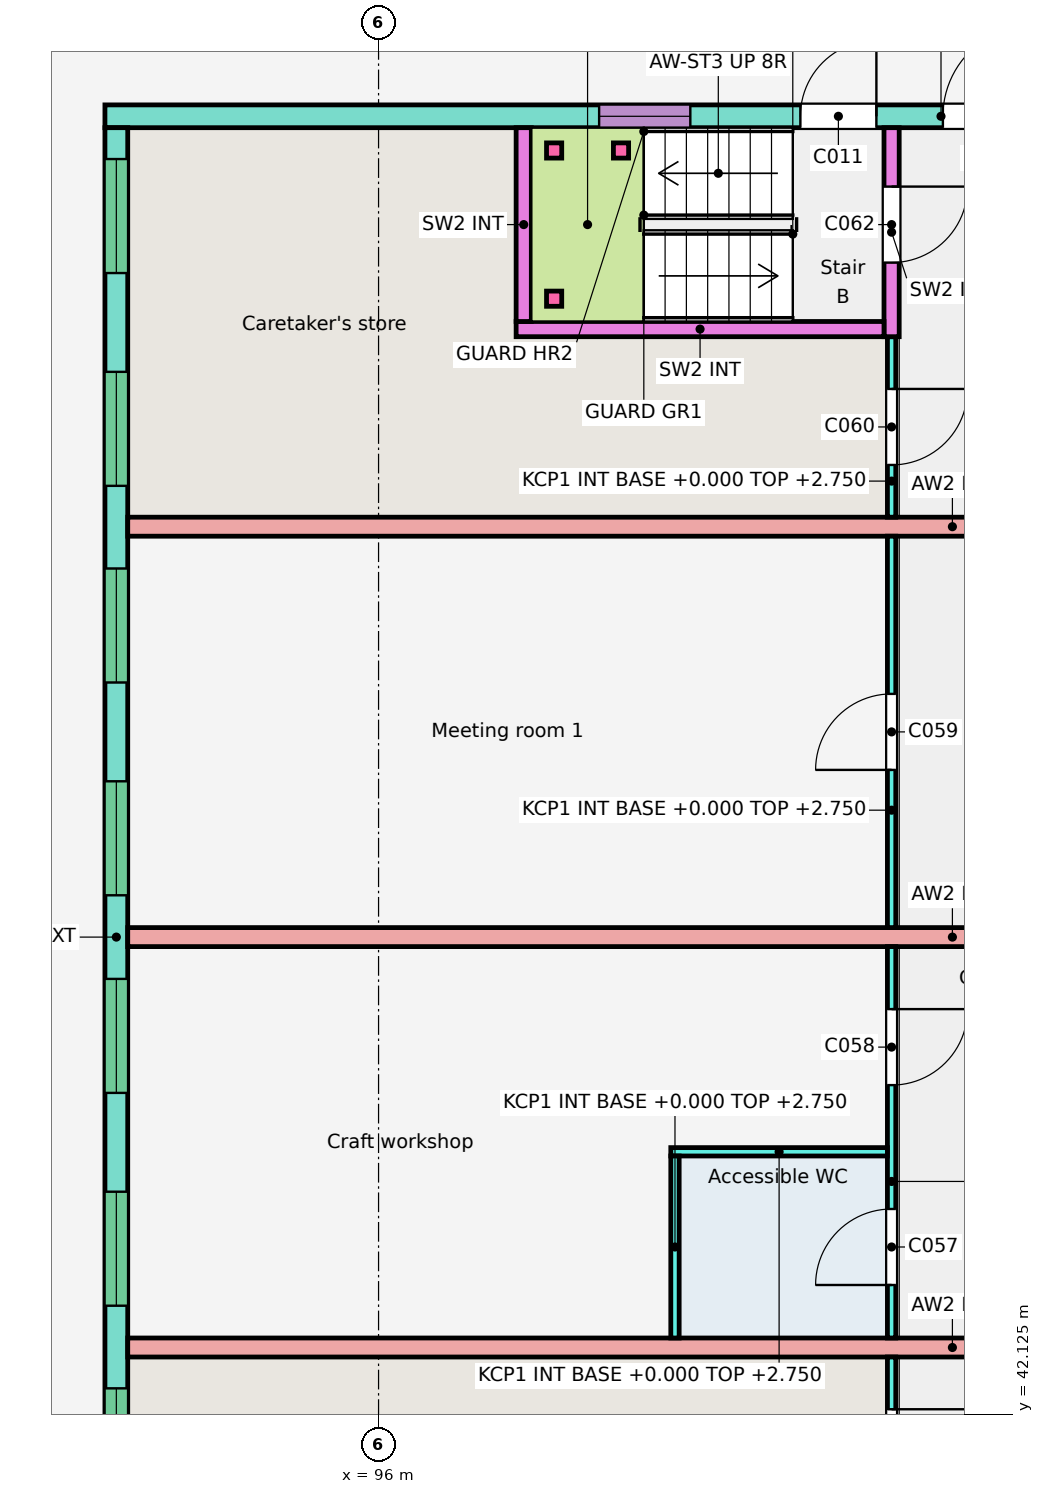
"""IFC4 building model, lengths in metres.
Left out: names, types, materials, properties, quantities, classifications, styles, units other than length and angle.
Written with IfcOpenShell. Run it as: python <this file> out.ifc"""

import sys

from ifc_helpers import new_model, si_unit, direction, frame, frame_2d, origin, origin_2d, place, context, subcontext, project, spatial, rectangle, extrude, element, fill, save


model = new_model("IFC4")
c1 = context("Model", 3, precision=1e-05, world=origin(), true_north=direction((0.0, 1.0)))
c2 = subcontext(c1, "Body", "Model", "MODEL_VIEW")
j1 = project(units=[si_unit("LENGTHUNIT", "METRE"), si_unit("PLANEANGLEUNIT", "RADIAN")], contexts=[c1])
p1 = place(None, origin())
s1 = spatial("IfcSite", under=j1, at=p1, CompositionType="ELEMENT")
p2 = place(p1, origin())
s2 = spatial("IfcBuilding", under=s1, at=p2, CompositionType="ELEMENT")
p3 = place(p2, origin())
s3 = spatial("IfcBuildingStorey", under=s2, at=p3, CompositionType="ELEMENT", Elevation=0.0)
p4 = place(p3, frame((114.4, 59.2, -0.25), z_axis=(0.0, 0.0, 1.0), x_axis=(-1.0, 0.0, 0.0)))
e1 = element("IfcWall", 1, at=p4, inside=s3, PredefinedType="SOLIDWALL", context=c2, shape_type="SweptSolid", body=[
    extrude(rectangle(XDim=22.0, YDim=0.3, at=frame_2d((11.0, 0.0))), origin(), (0.0, 0.0, 1.0), 3.25),
])
p5 = place(p4, frame((14.298, 0.0, 1.15)))
e2 = element("IfcOpeningElement", 2, at=p5, cuts=e1, PredefinedType="OPENING", context=c2, shape_type="SweptSolid", body=[
    extrude(rectangle(XDim=1.2, YDim=1.5, at=frame_2d((0.6, 0.75))), frame((0.0, 0.16, 0.0), z_axis=(0.0, -1.0, 0.0), x_axis=(1.0, 0.0, 0.0)), (0.0, 0.0, 1.0), 0.32),
])
p6 = place(p4, frame((9.775, 0.0, 0.25)))
e3 = element("IfcOpeningElement", 3, at=p6, cuts=e1, PredefinedType="OPENING", context=c2, shape_type="SweptSolid", body=[
    extrude(rectangle(XDim=1.2, YDim=2.1, at=frame_2d((0.6, 1.05))), frame((0.0, 0.16, 0.0), z_axis=(0.0, -1.0, 0.0), x_axis=(1.0, 0.0, 0.0)), (0.0, 0.0, 1.0), 0.32),
])
p7 = place(p4, frame((11.85, 0.0, 0.25)))
e4 = element("IfcOpeningElement", 4, at=p7, cuts=e1, PredefinedType="OPENING", context=c2, shape_type="SweptSolid", body=[
    extrude(rectangle(XDim=1.0, YDim=2.1, at=frame_2d((0.5, 1.05))), frame((0.0, 0.16, 0.0), z_axis=(0.0, -1.0, 0.0), x_axis=(1.0, 0.0, 0.0)), (0.0, 0.0, 1.0), 0.32),
])
p8 = place(p3, frame((92.55, 37.75, -0.25), z_axis=(0.0, 0.0, 1.0), x_axis=(0.0, 1.0, 0.0)))
e5 = element("IfcWall", 5, at=p8, inside=s3, PredefinedType="SOLIDWALL", context=c2, shape_type="SweptSolid", body=[
    extrude(rectangle(XDim=21.3, YDim=0.3, at=frame_2d((10.65, 0.0))), origin(), (0.0, 0.0, 1.0), 3.25),
])
p9 = place(p8, frame((0.413, 0.0, 1.15)))
e6 = element("IfcOpeningElement", 6, at=p9, cuts=e5, PredefinedType="OPENING", context=c2, shape_type="SweptSolid", body=[
    extrude(rectangle(XDim=1.5, YDim=1.4, at=frame_2d((0.75, 0.7))), frame((0.0, 0.16, 0.0), z_axis=(0.0, -1.0, 0.0), x_axis=(1.0, 0.0, 0.0)), (0.0, 0.0, 1.0), 0.32),
])
p10 = place(p8, frame((3.212, 0.0, 1.15)))
e7 = element("IfcOpeningElement", 7, at=p10, cuts=e5, PredefinedType="OPENING", context=c2, shape_type="SweptSolid", body=[
    extrude(rectangle(XDim=1.5, YDim=1.4, at=frame_2d((0.75, 0.7))), frame((0.0, 0.16, 0.0), z_axis=(0.0, -1.0, 0.0), x_axis=(1.0, 0.0, 0.0)), (0.0, 0.0, 1.0), 0.32),
])
p11 = place(p8, frame((5.8, 0.0, 1.15)))
e8 = element("IfcOpeningElement", 8, at=p11, cuts=e5, PredefinedType="OPENING", context=c2, shape_type="SweptSolid", body=[
    extrude(rectangle(XDim=1.5, YDim=1.4, at=frame_2d((0.75, 0.7))), frame((0.0, 0.16, 0.0), z_axis=(0.0, -1.0, 0.0), x_axis=(1.0, 0.0, 0.0)), (0.0, 0.0, 1.0), 0.32),
])
p12 = place(p8, frame((8.6, 0.0, 1.15)))
e9 = element("IfcOpeningElement", 9, at=p12, cuts=e5, PredefinedType="OPENING", context=c2, shape_type="SweptSolid", body=[
    extrude(rectangle(XDim=1.5, YDim=1.4, at=frame_2d((0.75, 0.7))), frame((0.0, 0.16, 0.0), z_axis=(0.0, -1.0, 0.0), x_axis=(1.0, 0.0, 0.0)), (0.0, 0.0, 1.0), 0.32),
])
p13 = place(p8, frame((11.2, 0.0, 1.15)))
e10 = element("IfcOpeningElement", 10, at=p13, cuts=e5, PredefinedType="OPENING", context=c2, shape_type="SweptSolid", body=[
    extrude(rectangle(XDim=1.5, YDim=1.4, at=frame_2d((0.75, 0.7))), frame((0.0, 0.16, 0.0), z_axis=(0.0, -1.0, 0.0), x_axis=(1.0, 0.0, 0.0)), (0.0, 0.0, 1.0), 0.32),
])
p14 = place(p8, frame((14.0, 0.0, 1.15)))
e11 = element("IfcOpeningElement", 11, at=p14, cuts=e5, PredefinedType="OPENING", context=c2, shape_type="SweptSolid", body=[
    extrude(rectangle(XDim=1.5, YDim=1.4, at=frame_2d((0.75, 0.7))), frame((0.0, 0.16, 0.0), z_axis=(0.0, -1.0, 0.0), x_axis=(1.0, 0.0, 0.0)), (0.0, 0.0, 1.0), 0.32),
])
p15 = place(p8, frame((16.587, 0.0, 1.15)))
e12 = element("IfcOpeningElement", 12, at=p15, cuts=e5, PredefinedType="OPENING", context=c2, shape_type="SweptSolid", body=[
    extrude(rectangle(XDim=1.5, YDim=1.4, at=frame_2d((0.75, 0.7))), frame((0.0, 0.16, 0.0), z_axis=(0.0, -1.0, 0.0), x_axis=(1.0, 0.0, 0.0)), (0.0, 0.0, 1.0), 0.32),
])
p16 = place(p8, frame((19.387, 0.0, 1.15)))
e13 = element("IfcOpeningElement", 13, at=p16, cuts=e5, PredefinedType="OPENING", context=c2, shape_type="SweptSolid", body=[
    extrude(rectangle(XDim=1.5, YDim=1.4, at=frame_2d((0.75, 0.7))), frame((0.0, 0.16, 0.0), z_axis=(0.0, -1.0, 0.0), x_axis=(1.0, 0.0, 0.0)), (0.0, 0.0, 1.0), 0.32),
])
for number, where, z_axis, x_axis in (
    (14, (114.4, 43.0, -0.25), (0.0, 0.0, 1.0), (-1.0, 0.0, 0.0)),
    (15, (114.4, 48.4, -0.25), (0.0, 0.0, 1.0), (-1.0, 0.0, 0.0)),
    (16, (114.4, 53.8, -0.25), (0.0, 0.0, 1.0), (-1.0, 0.0, 0.0)),
):
    element("IfcWall", number, at=place(p3, frame(where, z_axis=z_axis, x_axis=x_axis)), inside=s3, PredefinedType="SOLIDWALL", context=c2, shape_type="SweptSolid", body=[
        extrude(rectangle(XDim=21.7, YDim=0.25, at=frame_2d((10.85, 0.0))), origin(), (0.0, 0.0, 1.0), 3.25),
    ])
for number, where, z_axis, x_axis in (
    (17, (98.31, 56.8, 0.0), (0.0, 0.0, 1.0), (1.0, 0.0, 0.0)),
    (18, (98.31, 58.75, 0.0), (0.0, 0.0, 1.0), (1.0, 0.0, 0.0)),
    (19, (99.19, 58.75, 0.0), (0.0, 0.0, 1.0), (1.0, 0.0, 0.0)),
):
    element("IfcColumn", number, at=place(p3, frame(where, z_axis=z_axis, x_axis=x_axis)), inside=s3, PredefinedType="COLUMN", context=c2, shape_type="SweptSolid", body=[
        extrude(rectangle(XDim=0.2, YDim=0.2, at=origin_2d()), origin(), (0.0, 0.0, 1.0), 1.3),
    ])
p17 = place(p3, frame((102.75, 40.5, 0.0), z_axis=(0.0, 0.0, 1.0), x_axis=(0.0, 1.0, 0.0)))
e20 = element("IfcWall", 20, at=p17, inside=s3, PredefinedType="PARTITIONING", context=c2, shape_type="SweptSolid", body=[
    extrude(rectangle(XDim=2.375, YDim=0.11, at=frame_2d((1.188, 0.0))), origin(), (0.0, 0.0, 1.0), 2.75),
])
p18 = place(p17, frame((0.688, 0.0, 0.0)))
e21 = element("IfcOpeningElement", 21, at=p18, cuts=e20, PredefinedType="OPENING", context=c2, shape_type="SweptSolid", body=[
    extrude(rectangle(XDim=1.0, YDim=2.1, at=frame_2d((0.5, 1.05))), frame((0.0, 0.065, 0.0), z_axis=(0.0, -1.0, 0.0), x_axis=(1.0, 0.0, 0.0)), (0.0, 0.0, 1.0), 0.13),
])
p19 = place(p3, frame((102.75, 43.125, 0.0), z_axis=(0.0, 0.0, 1.0), x_axis=(0.0, 1.0, 0.0)))
e22 = element("IfcWall", 22, at=p19, inside=s3, PredefinedType="PARTITIONING", context=c2, shape_type="SweptSolid", body=[
    extrude(rectangle(XDim=5.15, YDim=0.11, at=frame_2d((2.575, 0.0))), origin(), (0.0, 0.0, 1.0), 2.75),
])
p20 = place(p19, frame((0.698, 0.0, 0.0)))
e23 = element("IfcOpeningElement", 23, at=p20, cuts=e22, PredefinedType="OPENING", context=c2, shape_type="SweptSolid", body=[
    extrude(rectangle(XDim=1.0, YDim=2.1, at=frame_2d((0.5, 1.05))), frame((0.0, 0.065, 0.0), z_axis=(0.0, -1.0, 0.0), x_axis=(1.0, 0.0, 0.0)), (0.0, 0.0, 1.0), 0.13),
])
p21 = place(p19, frame((3.327, 0.0, 0.0)))
e24 = element("IfcOpeningElement", 24, at=p21, cuts=e22, PredefinedType="OPENING", context=c2, shape_type="SweptSolid", body=[
    extrude(rectangle(XDim=1.0, YDim=2.1, at=frame_2d((0.5, 1.05))), frame((0.0, 0.065, 0.0), z_axis=(0.0, -1.0, 0.0), x_axis=(1.0, 0.0, 0.0)), (0.0, 0.0, 1.0), 0.13),
])
p22 = place(p3, frame((102.75, 48.525, 0.0), z_axis=(0.0, 0.0, 1.0), x_axis=(0.0, 1.0, 0.0)))
e25 = element("IfcWall", 25, at=p22, inside=s3, PredefinedType="PARTITIONING", context=c2, shape_type="SweptSolid", body=[
    extrude(rectangle(XDim=5.15, YDim=0.11, at=frame_2d((2.575, 0.0))), origin(), (0.0, 0.0, 1.0), 2.75),
])
p23 = place(p22, frame((2.075, 0.0, 0.0)))
e26 = element("IfcOpeningElement", 26, at=p23, cuts=e25, PredefinedType="OPENING", context=c2, shape_type="SweptSolid", body=[
    extrude(rectangle(XDim=1.0, YDim=2.1, at=frame_2d((0.5, 1.05))), frame((0.0, 0.065, 0.0), z_axis=(0.0, -1.0, 0.0), x_axis=(1.0, 0.0, 0.0)), (0.0, 0.0, 1.0), 0.13),
])
p24 = place(p3, frame((102.75, 53.925, 0.0), z_axis=(0.0, 0.0, 1.0), x_axis=(0.0, 1.0, 0.0)))
e27 = element("IfcWall", 27, at=p24, inside=s3, PredefinedType="PARTITIONING", context=c2, shape_type="SweptSolid", body=[
    extrude(rectangle(XDim=2.375, YDim=0.11, at=frame_2d((1.188, 0.0))), origin(), (0.0, 0.0, 1.0), 2.75),
])
p25 = place(p24, frame((0.688, 0.0, 0.0)))
e28 = element("IfcOpeningElement", 28, at=p25, cuts=e27, PredefinedType="OPENING", context=c2, shape_type="SweptSolid", body=[
    extrude(rectangle(XDim=1.0, YDim=2.1, at=frame_2d((0.5, 1.05))), frame((0.0, 0.065, 0.0), z_axis=(0.0, -1.0, 0.0), x_axis=(1.0, 0.0, 0.0)), (0.0, 0.0, 1.0), 0.13),
])
p26 = place(p3, frame((102.75, 56.3, 0.0), z_axis=(0.0, 0.0, 1.0), x_axis=(0.0, 1.0, 0.0)))
e29 = element("IfcWall", 29, at=p26, inside=s3, PredefinedType="SOLIDWALL", context=c2, shape_type="SweptSolid", body=[
    extrude(rectangle(XDim=2.75, YDim=0.2, at=frame_2d((1.375, 0.0))), origin(), (0.0, 0.0, 1.0), 2.75),
])
p27 = place(p26, frame((0.975, 0.0, 0.0)))
e30 = element("IfcOpeningElement", 30, at=p27, cuts=e29, PredefinedType="OPENING", context=c2, shape_type="SweptSolid", body=[
    extrude(rectangle(XDim=1.0, YDim=2.1, at=frame_2d((0.5, 1.05))), frame((0.0, 0.11, 0.0), z_axis=(0.0, -1.0, 0.0), x_axis=(1.0, 0.0, 0.0)), (0.0, 0.0, 1.0), 0.22),
])
p28 = place(p3, frame((102.65, 56.4, 0.0), z_axis=(0.0, 0.0, 1.0), x_axis=(-1.0, 0.0, 0.0)))
e31 = element("IfcWall", 31, at=p28, inside=s3, PredefinedType="SOLIDWALL", context=c2, shape_type="SweptSolid", body=[
    extrude(rectangle(XDim=4.84, YDim=0.2, at=frame_2d((2.42, 0.0))), origin(), (0.0, 0.0, 1.0), 2.75),
])
p29 = place(p3, frame((97.91, 59.05, 0.0), z_axis=(0.0, 0.0, 1.0), x_axis=(0.0, -1.0, 0.0)))
e32 = element("IfcWall", 32, at=p29, inside=s3, PredefinedType="SOLIDWALL", context=c2, shape_type="SweptSolid", body=[
    extrude(rectangle(XDim=2.55, YDim=0.2, at=frame_2d((1.275, 0.0))), origin(), (0.0, 0.0, 1.0), 2.75),
])
p30 = place(p3, frame((102.695, 45.575, 0.0), z_axis=(0.0, 0.0, 1.0), x_axis=(-1.0, 0.0, 0.0)))
e33 = element("IfcWall", 33, at=p30, inside=s3, PredefinedType="PARTITIONING", context=c2, shape_type="SweptSolid", body=[
    extrude(rectangle(XDim=2.85, YDim=0.11, at=frame_2d((1.425, 0.0))), origin(), (0.0, 0.0, 1.0), 2.75),
])
p31 = place(p3, frame((99.9, 43.125, 0.0), z_axis=(0.0, 0.0, 1.0), x_axis=(0.0, 1.0, 0.0)))
e34 = element("IfcWall", 34, at=p31, inside=s3, PredefinedType="PARTITIONING", context=c2, shape_type="SweptSolid", body=[
    extrude(rectangle(XDim=2.395, YDim=0.11, at=frame_2d((1.198, 0.0))), origin(), (0.0, 0.0, 1.0), 2.75),
])
p32 = place(p10, origin())
e35 = element("IfcWindow", 35, at=p32, inside=s3, PartitioningType="SINGLE_PANEL", PredefinedType="WINDOW", context=c2, shape_type="SweptSolid", body=[
    extrude(rectangle(XDim=1.5, YDim=1.4, at=frame_2d((0.75, 0.7))), frame((0.0, 0.03, 0.0), z_axis=(0.0, -1.0, 0.0), x_axis=(1.0, 0.0, 0.0)), (0.0, 0.0, 1.0), 0.06),
])
fill(e7, e35)
p33 = place(p11, origin())
e36 = element("IfcWindow", 36, at=p33, inside=s3, PartitioningType="SINGLE_PANEL", PredefinedType="WINDOW", context=c2, shape_type="SweptSolid", body=[
    extrude(rectangle(XDim=1.5, YDim=1.4, at=frame_2d((0.75, 0.7))), frame((0.0, 0.03, 0.0), z_axis=(0.0, -1.0, 0.0), x_axis=(1.0, 0.0, 0.0)), (0.0, 0.0, 1.0), 0.06),
])
fill(e8, e36)
p34 = place(p12, origin())
e37 = element("IfcWindow", 37, at=p34, inside=s3, PartitioningType="SINGLE_PANEL", PredefinedType="WINDOW", context=c2, shape_type="SweptSolid", body=[
    extrude(rectangle(XDim=1.5, YDim=1.4, at=frame_2d((0.75, 0.7))), frame((0.0, 0.03, 0.0), z_axis=(0.0, -1.0, 0.0), x_axis=(1.0, 0.0, 0.0)), (0.0, 0.0, 1.0), 0.06),
])
fill(e9, e37)
p35 = place(p13, origin())
e38 = element("IfcWindow", 38, at=p35, inside=s3, PartitioningType="SINGLE_PANEL", PredefinedType="WINDOW", context=c2, shape_type="SweptSolid", body=[
    extrude(rectangle(XDim=1.5, YDim=1.4, at=frame_2d((0.75, 0.7))), frame((0.0, 0.03, 0.0), z_axis=(0.0, -1.0, 0.0), x_axis=(1.0, 0.0, 0.0)), (0.0, 0.0, 1.0), 0.06),
])
fill(e10, e38)
p36 = place(p14, origin())
e39 = element("IfcWindow", 39, at=p36, inside=s3, PartitioningType="SINGLE_PANEL", PredefinedType="WINDOW", context=c2, shape_type="SweptSolid", body=[
    extrude(rectangle(XDim=1.5, YDim=1.4, at=frame_2d((0.75, 0.7))), frame((0.0, 0.03, 0.0), z_axis=(0.0, -1.0, 0.0), x_axis=(1.0, 0.0, 0.0)), (0.0, 0.0, 1.0), 0.06),
])
fill(e11, e39)
p37 = place(p15, origin())
e40 = element("IfcWindow", 40, at=p37, inside=s3, PartitioningType="SINGLE_PANEL", PredefinedType="WINDOW", context=c2, shape_type="SweptSolid", body=[
    extrude(rectangle(XDim=1.5, YDim=1.4, at=frame_2d((0.75, 0.7))), frame((0.0, 0.03, 0.0), z_axis=(0.0, -1.0, 0.0), x_axis=(1.0, 0.0, 0.0)), (0.0, 0.0, 1.0), 0.06),
])
fill(e12, e40)
p38 = place(p16, origin())
e41 = element("IfcWindow", 41, at=p38, inside=s3, PartitioningType="SINGLE_PANEL", PredefinedType="WINDOW", context=c2, shape_type="SweptSolid", body=[
    extrude(rectangle(XDim=1.5, YDim=1.4, at=frame_2d((0.75, 0.7))), frame((0.0, 0.03, 0.0), z_axis=(0.0, -1.0, 0.0), x_axis=(1.0, 0.0, 0.0)), (0.0, 0.0, 1.0), 0.06),
])
fill(e13, e41)
p39 = place(p5, origin())
e42 = element("IfcWindow", 42, at=p39, inside=s3, PartitioningType="SINGLE_PANEL", PredefinedType="WINDOW", context=c2, shape_type="SweptSolid", body=[
    extrude(rectangle(XDim=1.2, YDim=1.5, at=frame_2d((0.6, 0.75))), frame((0.0, 0.03, 0.0), z_axis=(0.0, -1.0, 0.0), x_axis=(1.0, 0.0, 0.0)), (0.0, 0.0, 1.0), 0.06),
])
fill(e2, e42)
p40 = place(p6, frame((1.2, 0.0, 0.0), z_axis=(0.0, 0.0, 1.0), x_axis=(-1.0, 0.0, 0.0)))
e43 = element("IfcDoor", 43, at=p40, inside=s3, OperationType="SINGLE_SWING_RIGHT", PredefinedType="DOOR", context=c2, shape_type="SweptSolid", body=[
    extrude(rectangle(XDim=1.2, YDim=2.1, at=frame_2d((0.6, 1.05))), frame((0.0, 0.025, 0.0), z_axis=(0.0, -1.0, 0.0), x_axis=(1.0, 0.0, 0.0)), (0.0, 0.0, 1.0), 0.05),
])
fill(e3, e43)
p41 = place(p7, frame((1.0, 0.0, 0.0), z_axis=(0.0, 0.0, 1.0), x_axis=(-1.0, 0.0, 0.0)))
e44 = element("IfcDoor", 44, at=p41, inside=s3, OperationType="SINGLE_SWING_RIGHT", PredefinedType="DOOR", context=c2, shape_type="SweptSolid", body=[
    extrude(rectangle(XDim=1.0, YDim=2.1, at=frame_2d((0.5, 1.05))), frame((0.0, 0.025, 0.0), z_axis=(0.0, -1.0, 0.0), x_axis=(1.0, 0.0, 0.0)), (0.0, 0.0, 1.0), 0.05),
])
fill(e4, e44)
p42 = place(p18, origin())
e45 = element("IfcDoor", 45, at=p42, inside=s3, OperationType="SINGLE_SWING_RIGHT", PredefinedType="DOOR", context=c2, shape_type="SweptSolid", body=[
    extrude(rectangle(XDim=1.0, YDim=2.1, at=frame_2d((0.5, 1.05))), frame((0.0, 0.025, 0.0), z_axis=(0.0, -1.0, 0.0), x_axis=(1.0, 0.0, 0.0)), (0.0, 0.0, 1.0), 0.05),
])
fill(e21, e45)
p43 = place(p20, origin())
e46 = element("IfcDoor", 46, at=p43, inside=s3, OperationType="SINGLE_SWING_LEFT", PredefinedType="DOOR", context=c2, shape_type="SweptSolid", body=[
    extrude(rectangle(XDim=1.0, YDim=2.1, at=frame_2d((0.5, 1.05))), frame((0.0, 0.025, 0.0), z_axis=(0.0, -1.0, 0.0), x_axis=(1.0, 0.0, 0.0)), (0.0, 0.0, 1.0), 0.05),
])
fill(e23, e46)
p44 = place(p21, origin())
e47 = element("IfcDoor", 47, at=p44, inside=s3, OperationType="SINGLE_SWING_RIGHT", PredefinedType="DOOR", context=c2, shape_type="SweptSolid", body=[
    extrude(rectangle(XDim=1.0, YDim=2.1, at=frame_2d((0.5, 1.05))), frame((0.0, 0.025, 0.0), z_axis=(0.0, -1.0, 0.0), x_axis=(1.0, 0.0, 0.0)), (0.0, 0.0, 1.0), 0.05),
])
fill(e24, e47)
p45 = place(p23, origin())
e48 = element("IfcDoor", 48, at=p45, inside=s3, OperationType="SINGLE_SWING_LEFT", PredefinedType="DOOR", context=c2, shape_type="SweptSolid", body=[
    extrude(rectangle(XDim=1.0, YDim=2.1, at=frame_2d((0.5, 1.05))), frame((0.0, 0.025, 0.0), z_axis=(0.0, -1.0, 0.0), x_axis=(1.0, 0.0, 0.0)), (0.0, 0.0, 1.0), 0.05),
])
fill(e26, e48)
p46 = place(p25, origin())
e49 = element("IfcDoor", 49, at=p46, inside=s3, OperationType="SINGLE_SWING_RIGHT", PredefinedType="DOOR", context=c2, shape_type="SweptSolid", body=[
    extrude(rectangle(XDim=1.0, YDim=2.1, at=frame_2d((0.5, 1.05))), frame((0.0, 0.025, 0.0), z_axis=(0.0, -1.0, 0.0), x_axis=(1.0, 0.0, 0.0)), (0.0, 0.0, 1.0), 0.05),
])
fill(e28, e49)
p47 = place(p27, origin())
e50 = element("IfcDoor", 50, at=p47, inside=s3, OperationType="SINGLE_SWING_RIGHT", PredefinedType="DOOR", context=c2, shape_type="SweptSolid", body=[
    extrude(rectangle(XDim=1.0, YDim=2.1, at=frame_2d((0.5, 1.05))), frame((0.0, 0.025, 0.0), z_axis=(0.0, -1.0, 0.0), x_axis=(1.0, 0.0, 0.0)), (0.0, 0.0, 1.0), 0.05),
])
fill(e30, e50)
save(model, sys.argv[1])
